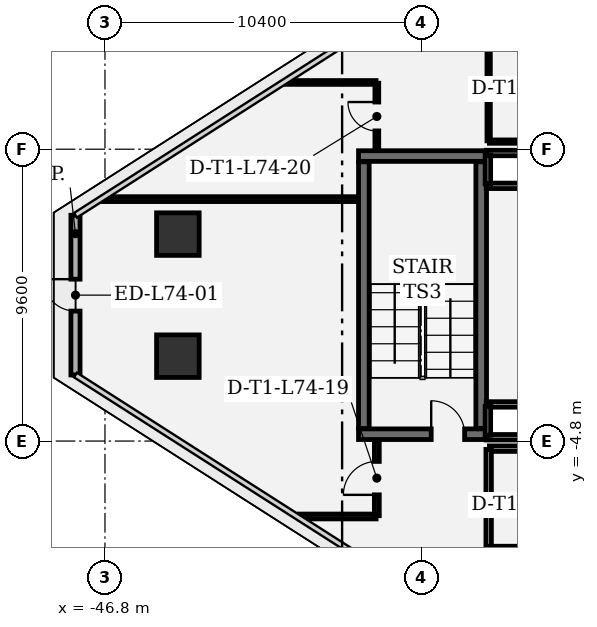
"""IFC4 building model, lengths in metres.
Left out: names, types, materials, properties, quantities, classifications, styles, units other than length and angle.
Written with IfcOpenShell. Run it as: python <this file> out.ifc"""

import sys

from ifc_helpers import new_model, si_unit, direction, frame, frame_2d, origin, origin_2d, place, context, subcontext, project, spatial, rectangle, extrude, element, fill, save


model = new_model("IFC4")
c1 = context("Model", 3, precision=1e-05, world=origin(), true_north=direction((0.0, 1.0)))
c2 = subcontext(c1, "Body", "Model", "MODEL_VIEW")
j1 = project(units=[si_unit("LENGTHUNIT", "METRE"), si_unit("PLANEANGLEUNIT", "RADIAN")], contexts=[c1])
p1 = place(None, origin())
s1 = spatial("IfcSite", under=j1, at=p1, CompositionType="ELEMENT")
p2 = place(p1, origin())
s2 = spatial("IfcBuilding", under=s1, at=p2, CompositionType="ELEMENT")
p3 = place(p2, frame((0.0, 0.0, 318.6)))
s3 = spatial("IfcBuildingStorey", under=s2, at=p3, CompositionType="ELEMENT", Elevation=318.6)
for number, where, z_axis, x_axis in (
    (1, (-44.403, 2.008, 0.0), (0.0, 0.0, 1.0), (1.0, 0.0, 0.0)),
    (2, (-44.403, -2.008, 0.0), (0.0, 0.0, 1.0), (1.0, 0.0, 0.0)),
):
    element("IfcColumn", number, at=place(p3, frame(where, z_axis=z_axis, x_axis=x_axis)), inside=s3, PredefinedType="COLUMN", context=c2, shape_type="SweptSolid", body=[
        extrude(rectangle(XDim=1.4, YDim=1.4, at=origin_2d()), origin(), (0.0, 0.0, 1.0), 4.2),
    ])
p4 = place(p3, frame((-47.77, -2.627, 0.0), z_axis=(0.0, 0.0, 1.0), x_axis=(0.0, 1.0, 0.0)))
e3 = element("IfcWall", 3, at=p4, inside=s3, PredefinedType="SOLIDWALL", context=c2, shape_type="SweptSolid", body=[
    extrude(rectangle(XDim=5.255, YDim=0.3, at=frame_2d((2.627, 0.0))), origin(), (0.0, 0.0, 1.0), 3.91),
])
p5 = place(p4, frame((2.102, 0.0, 0.0)))
e4 = element("IfcOpeningElement", 4, at=p5, cuts=e3, PredefinedType="OPENING", context=c2, shape_type="SweptSolid", body=[
    extrude(rectangle(XDim=1.05, YDim=2.2, at=frame_2d((0.525, 1.1))), frame((0.0, 0.16, 0.0), z_axis=(0.0, -1.0, 0.0), x_axis=(1.0, 0.0, 0.0)), (0.0, 0.0, 1.0), 0.32),
])
p6 = place(p3, frame((-38.46, -4.575, 0.0), z_axis=(0.0, 0.0, 1.0), x_axis=(1.0, 0.0, 0.0)))
e5 = element("IfcWall", 5, at=p6, inside=s3, PredefinedType="SHEAR", context=c2, shape_type="SweptSolid", body=[
    extrude(rectangle(XDim=4.21, YDim=0.35, at=frame_2d((2.105, 0.0))), origin(), (0.0, 0.0, 1.0), 3.91),
])
p7 = place(p6, frame((2.39, 0.0, 0.0)))
e6 = element("IfcOpeningElement", 6, at=p7, cuts=e5, PredefinedType="OPENING", context=c2, shape_type="SweptSolid", body=[
    extrude(rectangle(XDim=1.1, YDim=2.2, at=frame_2d((0.55, 1.1))), frame((0.0, 0.185, 0.0), z_axis=(0.0, -1.0, 0.0), x_axis=(1.0, 0.0, 0.0)), (0.0, 0.0, 1.0), 0.37),
])
p8 = place(p3, frame((-34.25, 4.575, 0.0), z_axis=(0.0, 0.0, 1.0), x_axis=(-1.0, 0.0, 0.0)))
e7 = element("IfcWall", 7, at=p8, inside=s3, PredefinedType="SHEAR", context=c2, shape_type="SweptSolid", body=[
    extrude(rectangle(XDim=4.21, YDim=0.35, at=frame_2d((2.105, 0.0))), origin(), (0.0, 0.0, 1.0), 3.91),
])
for number, where, z_axis, x_axis in (
    (8, (-34.425, -4.385, 0.0), (0.0, 0.0, 1.0), (0.0, 1.0, 0.0)),
    (9, (-38.285, 4.385, 0.0), (0.0, 0.0, 1.0), (0.0, -1.0, 0.0)),
):
    element("IfcWall", number, at=place(p3, frame(where, z_axis=z_axis, x_axis=x_axis)), inside=s3, PredefinedType="SHEAR", context=c2, shape_type="SweptSolid", body=[
        extrude(rectangle(XDim=8.77, YDim=0.35, at=frame_2d((4.385, 0.0))), origin(), (0.0, 0.0, 1.0), 3.91),
    ])
for number, where, z_axis, x_axis in (
    (10, (-32.99, 3.595, 0.0), (0.0, 0.0, 1.0), (-1.0, 0.0, 0.0)),
    (11, (-34.26, 4.675, 0.0), (0.0, 0.0, 1.0), (1.0, 0.0, 0.0)),
):
    element("IfcWall", number, at=place(p3, frame(where, z_axis=z_axis, x_axis=x_axis)), inside=s3, PredefinedType="PARTITIONING", context=c2, shape_type="SweptSolid", body=[
        extrude(rectangle(XDim=1.27, YDim=0.18, at=frame_2d((0.635, 0.0))), origin(), (0.0, 0.0, 1.0), 3.91),
    ])
p9 = place(p3, frame((-34.205, 3.66, 0.0), z_axis=(0.0, 0.0, 1.0), x_axis=(0.0, 1.0, 0.0)))
e12 = element("IfcWall", 12, at=p9, inside=s3, PredefinedType="PARTITIONING", context=c2, shape_type="SweptSolid", body=[
    extrude(rectangle(XDim=0.95, YDim=0.18, at=frame_2d((0.475, 0.0))), origin(), (0.0, 0.0, 1.0), 3.91),
])
for number, where, z_axis, x_axis in (
    (13, (-32.99, -4.675, 0.0), (0.0, 0.0, 1.0), (-1.0, 0.0, 0.0)),
    (14, (-34.26, -3.595, 0.0), (0.0, 0.0, 1.0), (1.0, 0.0, 0.0)),
):
    element("IfcWall", number, at=place(p3, frame(where, z_axis=z_axis, x_axis=x_axis)), inside=s3, PredefinedType="PARTITIONING", context=c2, shape_type="SweptSolid", body=[
        extrude(rectangle(XDim=1.27, YDim=0.18, at=frame_2d((0.635, 0.0))), origin(), (0.0, 0.0, 1.0), 3.91),
    ])
p10 = place(p3, frame((-34.205, -4.61, 0.0), z_axis=(0.0, 0.0, 1.0), x_axis=(0.0, 1.0, 0.0)))
e15 = element("IfcWall", 15, at=p10, inside=s3, PredefinedType="PARTITIONING", context=c2, shape_type="SweptSolid", body=[
    extrude(rectangle(XDim=0.95, YDim=0.18, at=frame_2d((0.475, 0.0))), origin(), (0.0, 0.0, 1.0), 3.91),
])
p11 = place(p3, frame((-34.18, 8.225, 0.0), z_axis=(0.0, 0.0, 1.0), x_axis=(0.0, -1.0, 0.0)))
e16 = element("IfcWall", 16, at=p11, inside=s3, PredefinedType="PARTITIONING", context=c2, shape_type="SweptSolid", body=[
    extrude(rectangle(XDim=3.15, YDim=0.11, at=frame_2d((1.575, 0.0))), origin(), (0.0, 0.0, 1.0), 3.91),
])
p12 = place(p3, frame((-34.155, 5.05, 0.0), z_axis=(0.0, 0.0, 1.0), x_axis=(1.0, 0.0, 0.0)))
e17 = element("IfcWall", 17, at=p12, inside=s3, PredefinedType="PARTITIONING", context=c2, shape_type="SweptSolid", body=[
    extrude(rectangle(XDim=3.19, YDim=0.11, at=frame_2d((1.595, 0.0))), origin(), (0.0, 0.0, 1.0), 3.91),
])
p13 = place(p3, frame((-30.965, -5.05, 0.0), z_axis=(0.0, 0.0, 1.0), x_axis=(-1.0, 0.0, 0.0)))
e18 = element("IfcWall", 18, at=p13, inside=s3, PredefinedType="PARTITIONING", context=c2, shape_type="SweptSolid", body=[
    extrude(rectangle(XDim=3.19, YDim=0.18, at=frame_2d((1.595, 0.0))), origin(), (0.0, 0.0, 1.0), 3.91),
])
p14 = place(p3, frame((-34.18, -5.075, 0.0), z_axis=(0.0, 0.0, 1.0), x_axis=(0.0, -1.0, 0.0)))
e19 = element("IfcWall", 19, at=p14, inside=s3, PredefinedType="PARTITIONING", context=c2, shape_type="SweptSolid", body=[
    extrude(rectangle(XDim=3.25, YDim=0.18, at=frame_2d((1.625, 0.0))), origin(), (0.0, 0.0, 1.0), 3.91),
])
p15 = place(p3, frame((-34.155, -8.35, 0.0), z_axis=(0.0, 0.0, 1.0), x_axis=(1.0, 0.0, 0.0)))
e20 = element("IfcWall", 20, at=p15, inside=s3, PredefinedType="PARTITIONING", context=c2, shape_type="SweptSolid", body=[
    extrude(rectangle(XDim=5.742, YDim=0.18, at=frame_2d((2.871, 0.0))), origin(), (0.0, 0.0, 1.0), 3.13),
])
p16 = place(p15, frame((2.431, 0.0, 0.0)))
e21 = element("IfcOpeningElement", 21, at=p16, cuts=e20, PredefinedType="OPENING", context=c2, shape_type="SweptSolid", body=[
    extrude(rectangle(XDim=0.88, YDim=2.1, at=frame_2d((0.44, 1.05))), frame((0.0, 0.1, 0.0), z_axis=(0.0, -1.0, 0.0), x_axis=(1.0, 0.0, 0.0)), (0.0, 0.0, 1.0), 0.2),
])
p17 = place(p3, frame((-37.858, -7.256, 0.0), z_axis=(0.0, 0.0, 1.0), x_axis=(0.0, 1.0, 0.0)))
e22 = element("IfcWall", 22, at=p17, inside=s3, PredefinedType="PARTITIONING", context=c2, shape_type="SweptSolid", body=[
    extrude(rectangle(XDim=2.473, YDim=0.16, at=frame_2d((1.236, 0.0))), origin(), (0.0, 0.0, 1.0), 3.91),
])
p18 = place(p17, frame((0.687, 0.0, 0.0)))
e23 = element("IfcOpeningElement", 23, at=p18, cuts=e22, PredefinedType="OPENING", context=c2, shape_type="SweptSolid", body=[
    extrude(rectangle(XDim=1.1, YDim=2.15, at=frame_2d((0.55, 1.075))), frame((0.0, 0.09, 0.0), z_axis=(0.0, -1.0, 0.0), x_axis=(1.0, 0.0, 0.0)), (0.0, 0.0, 1.0), 0.18),
])
p19 = place(p3, frame((-38.493, 3.158, 0.0), z_axis=(0.0, 0.0, 1.0), x_axis=(-1.0, 0.0, 0.0)))
e24 = element("IfcWall", 24, at=p19, inside=s3, PredefinedType="PARTITIONING", context=c2, shape_type="SweptSolid", body=[
    extrude(rectangle(XDim=8.367, YDim=0.16, at=frame_2d((4.184, 0.0))), origin(), (0.0, 0.0, 1.0), 3.13),
])
p20 = place(p3, frame((-40.409, -7.281, 0.0), z_axis=(0.0, 0.0, 1.0), x_axis=(1.0, 0.0, 0.0)))
e25 = element("IfcWall", 25, at=p20, inside=s3, PredefinedType="PARTITIONING", context=c2, shape_type="SweptSolid", body=[
    extrude(rectangle(XDim=2.526, YDim=0.16, at=frame_2d((1.263, 0.0))), origin(), (0.0, 0.0, 1.0), 3.91),
])
p21 = place(p3, frame((-37.858, 4.783, 0.0), z_axis=(0.0, 0.0, 1.0), x_axis=(0.0, 1.0, 0.0)))
e26 = element("IfcWall", 26, at=p21, inside=s3, PredefinedType="PARTITIONING", context=c2, shape_type="SweptSolid", body=[
    extrude(rectangle(XDim=2.187, YDim=0.125, at=frame_2d((1.094, 0.0))), origin(), (0.0, 0.0, 1.0), 3.91),
])
p22 = place(p21, frame((0.619, 0.0, 0.0)))
e27 = element("IfcOpeningElement", 27, at=p22, cuts=e26, PredefinedType="OPENING", context=c2, shape_type="SweptSolid", body=[
    extrude(rectangle(XDim=0.95, YDim=2.15, at=frame_2d((0.475, 1.075))), frame((0.0, 0.073, 0.0), z_axis=(0.0, -1.0, 0.0), x_axis=(1.0, 0.0, 0.0)), (0.0, 0.0, 1.0), 0.145),
])
p23 = place(p3, frame((-37.883, 6.995, 0.0), z_axis=(0.0, 0.0, 1.0), x_axis=(-1.0, 0.0, 0.0)))
e28 = element("IfcWall", 28, at=p23, inside=s3, PredefinedType="PARTITIONING", context=c2, shape_type="SweptSolid", body=[
    extrude(rectangle(XDim=2.973, YDim=0.125, at=frame_2d((1.486, 0.0))), origin(), (0.0, 0.0, 1.0), 3.91),
])
p24 = place(p5, origin())
e29 = element("IfcDoor", 29, at=p24, inside=s3, OperationType="SINGLE_SWING_RIGHT", PredefinedType="DOOR", context=c2, shape_type="SweptSolid", body=[
    extrude(rectangle(XDim=1.05, YDim=2.2, at=frame_2d((0.525, 1.1))), frame((0.0, 0.025, 0.0), z_axis=(0.0, -1.0, 0.0), x_axis=(1.0, 0.0, 0.0)), (0.0, 0.0, 1.0), 0.05),
])
fill(e4, e29)
p25 = place(p7, origin())
e30 = element("IfcDoor", 30, at=p25, inside=s3, OperationType="SINGLE_SWING_LEFT", PredefinedType="DOOR", context=c2, shape_type="SweptSolid", body=[
    extrude(rectangle(XDim=1.1, YDim=2.2, at=frame_2d((0.55, 1.1))), frame((0.0, 0.025, 0.0), z_axis=(0.0, -1.0, 0.0), x_axis=(1.0, 0.0, 0.0)), (0.0, 0.0, 1.0), 0.05),
])
fill(e6, e30)
p26 = place(p18, origin())
e31 = element("IfcDoor", 31, at=p26, inside=s3, OperationType="SINGLE_SWING_LEFT", PredefinedType="DOOR", context=c2, shape_type="SweptSolid", body=[
    extrude(rectangle(XDim=1.1, YDim=2.15, at=frame_2d((0.55, 1.075))), frame((0.0, 0.025, 0.0), z_axis=(0.0, -1.0, 0.0), x_axis=(1.0, 0.0, 0.0)), (0.0, 0.0, 1.0), 0.05),
])
fill(e23, e31)
p27 = place(p22, origin())
e32 = element("IfcDoor", 32, at=p27, inside=s3, OperationType="SINGLE_SWING_RIGHT", PredefinedType="DOOR", context=c2, shape_type="SweptSolid", body=[
    extrude(rectangle(XDim=0.95, YDim=2.15, at=frame_2d((0.475, 1.075))), frame((0.0, 0.025, 0.0), z_axis=(0.0, -1.0, 0.0), x_axis=(1.0, 0.0, 0.0)), (0.0, 0.0, 1.0), 0.05),
])
fill(e27, e32)
save(model, sys.argv[1])
